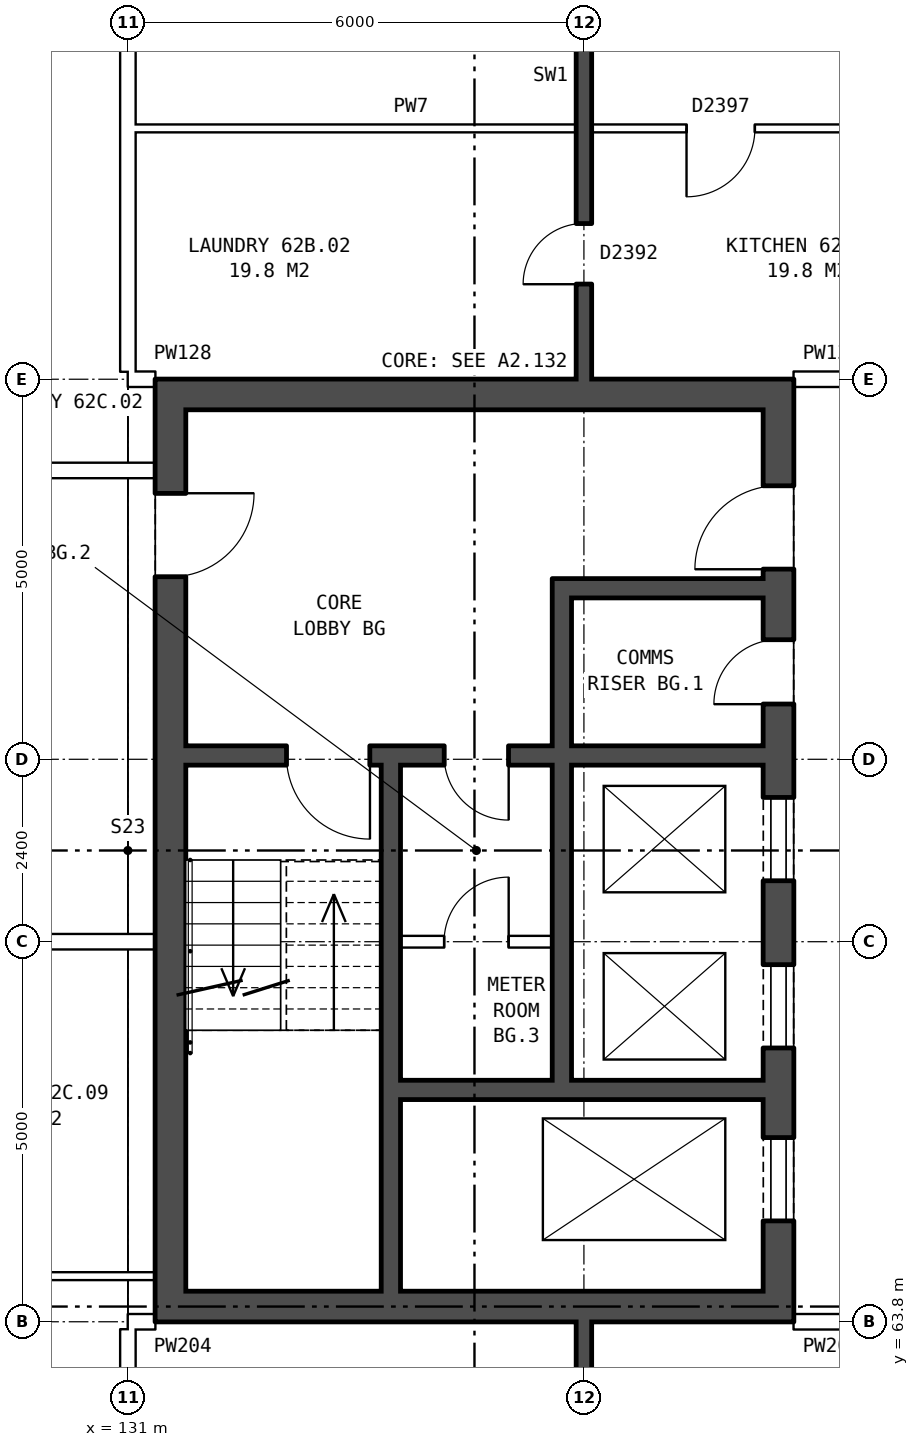
"""IFC4 building model, lengths in metres.
Left out: names, types, materials, properties, quantities, classifications, styles, units other than length and angle.
Written with IfcOpenShell. Run it as: python <this file> out.ifc"""

import sys

from ifc_helpers import new_model, si_unit, direction, frame, frame_2d, origin, place, context, subcontext, project, spatial, rectangle, extrude, element, fill, save


model = new_model("IFC4")
c1 = context("Model", 3, precision=1e-05, world=origin(), true_north=direction((0.0, 1.0)))
c2 = subcontext(c1, "Body", "Model", "MODEL_VIEW")
j1 = project(units=[si_unit("LENGTHUNIT", "METRE"), si_unit("PLANEANGLEUNIT", "RADIAN")], contexts=[c1])
p1 = place(None, origin())
s1 = spatial("IfcSite", under=j1, at=p1, CompositionType="ELEMENT")
p2 = place(p1, origin())
s2 = spatial("IfcBuilding", under=s1, at=p2, CompositionType="ELEMENT")
p3 = place(p2, frame((0.0, 0.0, 221.4)))
s3 = spatial("IfcBuildingStorey", under=s2, at=p3, CompositionType="ELEMENT", Elevation=221.4)
p4 = place(p3, frame((139.56, 63.8, 0.0), z_axis=(0.0, 0.0, 1.0), x_axis=(0.0, 1.0, 0.0)))
e1 = element("IfcWall", 1, at=p4, inside=s3, PredefinedType="SHEAR", context=c2, shape_type="SweptSolid", body=[
    extrude(rectangle(XDim=12.4, YDim=0.4, at=frame_2d((6.2, 0.0))), origin(), (0.0, 0.0, 1.0), 2.85),
])
p5 = place(p4, frame((1.325, 0.0, 0.0)))
e2 = element("IfcOpeningElement", 2, at=p5, cuts=e1, PredefinedType="OPENING", context=c2, shape_type="SweptSolid", body=[
    extrude(rectangle(XDim=1.1, YDim=2.1, at=frame_2d((0.55, 1.05))), frame((0.0, 0.21, 0.0), z_axis=(0.0, -1.0, 0.0), x_axis=(1.0, 0.0, 0.0)), (0.0, 0.0, 1.0), 0.42),
])
p6 = place(p4, frame((3.6, 0.0, 0.0)))
e3 = element("IfcOpeningElement", 3, at=p6, cuts=e1, PredefinedType="OPENING", context=c2, shape_type="SweptSolid", body=[
    extrude(rectangle(XDim=1.1, YDim=2.1, at=frame_2d((0.55, 1.05))), frame((0.0, 0.21, 0.0), z_axis=(0.0, -1.0, 0.0), x_axis=(1.0, 0.0, 0.0)), (0.0, 0.0, 1.0), 0.42),
])
p7 = place(p4, frame((5.8, 0.0, 0.0)))
e4 = element("IfcOpeningElement", 4, at=p7, cuts=e1, PredefinedType="OPENING", context=c2, shape_type="SweptSolid", body=[
    extrude(rectangle(XDim=1.1, YDim=2.1, at=frame_2d((0.55, 1.05))), frame((0.0, 0.21, 0.0), z_axis=(0.0, -1.0, 0.0), x_axis=(1.0, 0.0, 0.0)), (0.0, 0.0, 1.0), 0.42),
])
p8 = place(p4, frame((9.9, 0.0, 0.0)))
e5 = element("IfcOpeningElement", 5, at=p8, cuts=e1, PredefinedType="OPENING", context=c2, shape_type="SweptSolid", body=[
    extrude(rectangle(XDim=1.1, YDim=2.1, at=frame_2d((0.55, 1.05))), frame((0.0, 0.21, 0.0), z_axis=(0.0, -1.0, 0.0), x_axis=(1.0, 0.0, 0.0)), (0.0, 0.0, 1.0), 0.42),
])
p9 = place(p4, frame((8.125, 0.0, 0.0)))
e6 = element("IfcOpeningElement", 6, at=p9, cuts=e1, PredefinedType="OPENING", context=c2, shape_type="SweptSolid", body=[
    extrude(rectangle(XDim=0.85, YDim=2.1, at=frame_2d((0.425, 1.05))), frame((0.0, 0.21, 0.0), z_axis=(0.0, -1.0, 0.0), x_axis=(1.0, 0.0, 0.0)), (0.0, 0.0, 1.0), 0.42),
])
p10 = place(p3, frame((131.56, 63.8, 0.0), z_axis=(0.0, 0.0, 1.0), x_axis=(0.0, 1.0, 0.0)))
e7 = element("IfcWall", 7, at=p10, inside=s3, PredefinedType="SHEAR", context=c2, shape_type="SweptSolid", body=[
    extrude(rectangle(XDim=12.4, YDim=0.4, at=frame_2d((6.2, 0.0))), origin(), (0.0, 0.0, 1.0), 2.85),
])
p11 = place(p10, frame((9.8, 0.0, 0.0)))
e8 = element("IfcOpeningElement", 8, at=p11, cuts=e7, PredefinedType="OPENING", context=c2, shape_type="SweptSolid", body=[
    extrude(rectangle(XDim=1.1, YDim=2.1, at=frame_2d((0.55, 1.05))), frame((0.0, 0.21, 0.0), z_axis=(0.0, -1.0, 0.0), x_axis=(1.0, 0.0, 0.0)), (0.0, 0.0, 1.0), 0.42),
])
for number, where, z_axis, x_axis in (
    (9, (139.36, 64.0, 0.0), (0.0, 0.0, 1.0), (-1.0, 0.0, 0.0)),
    (10, (139.36, 76.0, 0.0), (0.0, 0.0, 1.0), (-1.0, 0.0, 0.0)),
):
    element("IfcWall", number, at=place(p3, frame(where, z_axis=z_axis, x_axis=x_axis)), inside=s3, PredefinedType="SHEAR", context=c2, shape_type="SweptSolid", body=[
        extrude(rectangle(XDim=7.6, YDim=0.4, at=frame_2d((3.8, 0.0))), origin(), (0.0, 0.0, 1.0), 2.85),
    ])
p12 = place(p3, frame((139.36, 66.85, 0.0), z_axis=(0.0, 0.0, 1.0), x_axis=(-1.0, 0.0, 0.0)))
e11 = element("IfcWall", 11, at=p12, inside=s3, PredefinedType="SHEAR", context=c2, shape_type="SweptSolid", body=[
    extrude(rectangle(XDim=4.775, YDim=0.25, at=frame_2d((2.388, 0.0))), origin(), (0.0, 0.0, 1.0), 2.85),
])
p13 = place(p3, frame((136.585, 68.8, 0.0), z_axis=(0.0, 0.0, 1.0), x_axis=(-1.0, 0.0, 0.0)))
e12 = element("IfcWall", 12, at=p13, inside=s3, PredefinedType="PARTITIONING", context=c2, shape_type="SweptSolid", body=[
    extrude(rectangle(XDim=2.0, YDim=0.15, at=frame_2d((1.0, 0.0))), origin(), (0.0, 0.0, 1.0), 2.85),
])
p14 = place(p13, frame((0.575, 0.0, 0.0)))
e13 = element("IfcOpeningElement", 13, at=p14, cuts=e12, PredefinedType="OPENING", context=c2, shape_type="SweptSolid", body=[
    extrude(rectangle(XDim=0.85, YDim=2.1, at=frame_2d((0.425, 1.05))), frame((0.0, 0.085, 0.0), z_axis=(0.0, -1.0, 0.0), x_axis=(1.0, 0.0, 0.0)), (0.0, 0.0, 1.0), 0.17),
])
p15 = place(p3, frame((139.36, 71.25, 0.0), z_axis=(0.0, 0.0, 1.0), x_axis=(-1.0, 0.0, 0.0)))
e14 = element("IfcWall", 14, at=p15, inside=s3, PredefinedType="SHEAR", context=c2, shape_type="SweptSolid", body=[
    extrude(rectangle(XDim=7.6, YDim=0.25, at=frame_2d((3.8, 0.0))), origin(), (0.0, 0.0, 1.0), 2.85),
])
p16 = place(p15, frame((5.175, 0.0, 0.0)))
e15 = element("IfcOpeningElement", 15, at=p16, cuts=e14, PredefinedType="OPENING", context=c2, shape_type="SweptSolid", body=[
    extrude(rectangle(XDim=1.1, YDim=2.1, at=frame_2d((0.55, 1.05))), frame((0.0, 0.135, 0.0), z_axis=(0.0, -1.0, 0.0), x_axis=(1.0, 0.0, 0.0)), (0.0, 0.0, 1.0), 0.27),
])
p17 = place(p15, frame((3.35, 0.0, 0.0)))
e16 = element("IfcOpeningElement", 16, at=p17, cuts=e14, PredefinedType="OPENING", context=c2, shape_type="SweptSolid", body=[
    extrude(rectangle(XDim=0.85, YDim=2.1, at=frame_2d((0.425, 1.05))), frame((0.0, 0.135, 0.0), z_axis=(0.0, -1.0, 0.0), x_axis=(1.0, 0.0, 0.0)), (0.0, 0.0, 1.0), 0.27),
])
p18 = place(p3, frame((139.36, 73.45, 0.0), z_axis=(0.0, 0.0, 1.0), x_axis=(-1.0, 0.0, 0.0)))
e17 = element("IfcWall", 17, at=p18, inside=s3, PredefinedType="SHEAR", context=c2, shape_type="SweptSolid", body=[
    extrude(rectangle(XDim=2.525, YDim=0.25, at=frame_2d((1.263, 0.0))), origin(), (0.0, 0.0, 1.0), 2.85),
])
p19 = place(p3, frame((136.71, 66.975, 0.0), z_axis=(0.0, 0.0, 1.0), x_axis=(0.0, 1.0, 0.0)))
e18 = element("IfcWall", 18, at=p19, inside=s3, PredefinedType="SHEAR", context=c2, shape_type="SweptSolid", body=[
    extrude(rectangle(XDim=4.15, YDim=0.25, at=frame_2d((2.075, 0.0))), origin(), (0.0, 0.0, 1.0), 2.85),
])
p20 = place(p3, frame((136.71, 71.375, 0.0), z_axis=(0.0, 0.0, 1.0), x_axis=(0.0, 1.0, 0.0)))
e19 = element("IfcWall", 19, at=p20, inside=s3, PredefinedType="SHEAR", context=c2, shape_type="SweptSolid", body=[
    extrude(rectangle(XDim=2.2, YDim=0.25, at=frame_2d((1.1, 0.0))), origin(), (0.0, 0.0, 1.0), 2.85),
])
p21 = place(p3, frame((134.46, 64.2, 0.0), z_axis=(0.0, 0.0, 1.0), x_axis=(0.0, 1.0, 0.0)))
e20 = element("IfcWall", 20, at=p21, inside=s3, PredefinedType="SHEAR", context=c2, shape_type="SweptSolid", body=[
    extrude(rectangle(XDim=6.925, YDim=0.25, at=frame_2d((3.462, 0.0))), origin(), (0.0, 0.0, 1.0), 2.85),
])
p22 = place(p3, frame((131.0, 63.8, 0.0), z_axis=(0.0, 0.0, 1.0), x_axis=(1.0, 0.0, 0.0)))
e21 = element("IfcWall", 21, at=p22, inside=s3, PredefinedType="PARTITIONING", context=c2, shape_type="SweptSolid", body=[
    extrude(rectangle(XDim=0.36, YDim=0.2, at=frame_2d((0.18, 0.0))), origin(), (0.0, 0.0, 1.0), 2.85),
])
p23 = place(p3, frame((139.76, 63.8, 0.0), z_axis=(0.0, 0.0, 1.0), x_axis=(1.0, 0.0, 0.0)))
e22 = element("IfcWall", 22, at=p23, inside=s3, PredefinedType="PARTITIONING", context=c2, shape_type="SweptSolid", body=[
    extrude(rectangle(XDim=3.0, YDim=0.2, at=frame_2d((1.5, 0.0))), origin(), (0.0, 0.0, 1.0), 2.85),
])
p24 = place(p23, frame((1.0, 0.0, 0.0)))
e23 = element("IfcOpeningElement", 23, at=p24, cuts=e22, PredefinedType="OPENING", context=c2, shape_type="SweptSolid", body=[
    extrude(rectangle(XDim=1.0, YDim=2.1, at=frame_2d((0.5, 1.05))), frame((0.0, 0.11, 0.0), z_axis=(0.0, -1.0, 0.0), x_axis=(1.0, 0.0, 0.0)), (0.0, 0.0, 1.0), 0.22),
])
p25 = place(p3, frame((127.912, 64.4, 0.0), z_axis=(0.0, 0.0, 1.0), x_axis=(1.0, 0.0, 0.0)))
e24 = element("IfcWall", 24, at=p25, inside=s3, PredefinedType="PARTITIONING", context=c2, shape_type="SweptSolid", body=[
    extrude(rectangle(XDim=3.448, YDim=0.1, at=frame_2d((1.724, 0.0))), origin(), (0.0, 0.0, 1.0), 2.85),
])
p26 = place(p3, frame((75.64, 68.8, 0.0), z_axis=(0.0, 0.0, 1.0), x_axis=(1.0, 0.0, 0.0)))
e25 = element("IfcWall", 25, at=p26, inside=s3, PredefinedType="PARTITIONING", context=c2, shape_type="SweptSolid", body=[
    extrude(rectangle(XDim=55.72, YDim=0.2, at=frame_2d((27.86, 0.0))), origin(), (0.0, 0.0, 1.0), 2.85),
])
p27 = place(p26, frame((1.399, 0.0, 0.0)))
e26 = element("IfcOpeningElement", 26, at=p27, cuts=e25, PredefinedType="OPENING", context=c2, shape_type="SweptSolid", body=[
    extrude(rectangle(XDim=1.0, YDim=2.1, at=frame_2d((0.5, 1.05))), frame((0.0, 0.11, 0.0), z_axis=(0.0, -1.0, 0.0), x_axis=(1.0, 0.0, 0.0)), (0.0, 0.0, 1.0), 0.22),
])
p28 = place(p26, frame((12.241, 0.0, 0.0)))
e27 = element("IfcOpeningElement", 27, at=p28, cuts=e25, PredefinedType="OPENING", context=c2, shape_type="SweptSolid", body=[
    extrude(rectangle(XDim=1.0, YDim=2.1, at=frame_2d((0.5, 1.05))), frame((0.0, 0.11, 0.0), z_axis=(0.0, -1.0, 0.0), x_axis=(1.0, 0.0, 0.0)), (0.0, 0.0, 1.0), 0.22),
])
p29 = place(p26, frame((22.553, 0.0, 0.0)))
e28 = element("IfcOpeningElement", 28, at=p29, cuts=e25, PredefinedType="OPENING", context=c2, shape_type="SweptSolid", body=[
    extrude(rectangle(XDim=1.0, YDim=2.1, at=frame_2d((0.5, 1.05))), frame((0.0, 0.11, 0.0), z_axis=(0.0, -1.0, 0.0), x_axis=(1.0, 0.0, 0.0)), (0.0, 0.0, 1.0), 0.22),
])
p30 = place(p26, frame((32.866, 0.0, 0.0)))
e29 = element("IfcOpeningElement", 29, at=p30, cuts=e25, PredefinedType="OPENING", context=c2, shape_type="SweptSolid", body=[
    extrude(rectangle(XDim=1.0, YDim=2.1, at=frame_2d((0.5, 1.05))), frame((0.0, 0.11, 0.0), z_axis=(0.0, -1.0, 0.0), x_axis=(1.0, 0.0, 0.0)), (0.0, 0.0, 1.0), 0.22),
])
p31 = place(p26, frame((36.303, 0.0, 0.0)))
e30 = element("IfcOpeningElement", 30, at=p31, cuts=e25, PredefinedType="OPENING", context=c2, shape_type="SweptSolid", body=[
    extrude(rectangle(XDim=1.0, YDim=2.1, at=frame_2d((0.5, 1.05))), frame((0.0, 0.11, 0.0), z_axis=(0.0, -1.0, 0.0), x_axis=(1.0, 0.0, 0.0)), (0.0, 0.0, 1.0), 0.22),
])
p32 = place(p26, frame((46.616, 0.0, 0.0)))
e31 = element("IfcOpeningElement", 31, at=p32, cuts=e25, PredefinedType="OPENING", context=c2, shape_type="SweptSolid", body=[
    extrude(rectangle(XDim=1.0, YDim=2.1, at=frame_2d((0.5, 1.05))), frame((0.0, 0.11, 0.0), z_axis=(0.0, -1.0, 0.0), x_axis=(1.0, 0.0, 0.0)), (0.0, 0.0, 1.0), 0.22),
])
p33 = place(p26, frame((50.053, 0.0, 0.0)))
e32 = element("IfcOpeningElement", 32, at=p33, cuts=e25, PredefinedType="OPENING", context=c2, shape_type="SweptSolid", body=[
    extrude(rectangle(XDim=1.0, YDim=2.1, at=frame_2d((0.5, 1.05))), frame((0.0, 0.11, 0.0), z_axis=(0.0, -1.0, 0.0), x_axis=(1.0, 0.0, 0.0)), (0.0, 0.0, 1.0), 0.22),
])
p34 = place(p3, frame((124.475, 75.0, 0.0), z_axis=(0.0, 0.0, 1.0), x_axis=(1.0, 0.0, 0.0)))
e33 = element("IfcWall", 33, at=p34, inside=s3, PredefinedType="PARTITIONING", context=c2, shape_type="SweptSolid", body=[
    extrude(rectangle(XDim=6.885, YDim=0.2, at=frame_2d((3.442, 0.0))), origin(), (0.0, 0.0, 1.0), 2.85),
])
p35 = place(p34, frame((2.992, 0.0, 0.0)))
e34 = element("IfcOpeningElement", 34, at=p35, cuts=e33, PredefinedType="OPENING", context=c2, shape_type="SweptSolid", body=[
    extrude(rectangle(XDim=0.9, YDim=2.1, at=frame_2d((0.45, 1.05))), frame((0.0, 0.11, 0.0), z_axis=(0.0, -1.0, 0.0), x_axis=(1.0, 0.0, 0.0)), (0.0, 0.0, 1.0), 0.22),
])
p36 = place(p3, frame((131.0, 76.2, 0.0), z_axis=(0.0, 0.0, 1.0), x_axis=(1.0, 0.0, 0.0)))
e35 = element("IfcWall", 35, at=p36, inside=s3, PredefinedType="PARTITIONING", context=c2, shape_type="SweptSolid", body=[
    extrude(rectangle(XDim=0.36, YDim=0.2, at=frame_2d((0.18, 0.0))), origin(), (0.0, 0.0, 1.0), 2.85),
])
p37 = place(p3, frame((139.76, 76.2, 0.0), z_axis=(0.0, 0.0, 1.0), x_axis=(1.0, 0.0, 0.0)))
e36 = element("IfcWall", 36, at=p37, inside=s3, PredefinedType="PARTITIONING", context=c2, shape_type="SweptSolid", body=[
    extrude(rectangle(XDim=3.0, YDim=0.2, at=frame_2d((1.5, 0.0))), origin(), (0.0, 0.0, 1.0), 2.85),
])
p38 = place(p37, frame((1.0, 0.0, 0.0)))
e37 = element("IfcOpeningElement", 37, at=p38, cuts=e36, PredefinedType="OPENING", context=c2, shape_type="SweptSolid", body=[
    extrude(rectangle(XDim=1.0, YDim=2.1, at=frame_2d((0.5, 1.05))), frame((0.0, 0.11, 0.0), z_axis=(0.0, -1.0, 0.0), x_axis=(1.0, 0.0, 0.0)), (0.0, 0.0, 1.0), 0.22),
])
p39 = place(p3, frame((131.1, 79.5, 0.0), z_axis=(0.0, 0.0, 1.0), x_axis=(1.0, 0.0, 0.0)))
e38 = element("IfcWall", 38, at=p39, inside=s3, PredefinedType="PARTITIONING", context=c2, shape_type="SweptSolid", body=[
    extrude(rectangle(XDim=11.8, YDim=0.1, at=frame_2d((5.9, 0.0))), origin(), (0.0, 0.0, 1.0), 2.85),
])
p40 = place(p39, frame((7.25, 0.0, 0.0)))
e39 = element("IfcOpeningElement", 39, at=p40, cuts=e38, PredefinedType="OPENING", context=c2, shape_type="SweptSolid", body=[
    extrude(rectangle(XDim=0.9, YDim=2.1, at=frame_2d((0.45, 1.05))), frame((0.0, 0.06, 0.0), z_axis=(0.0, -1.0, 0.0), x_axis=(1.0, 0.0, 0.0)), (0.0, 0.0, 1.0), 0.12),
])
p41 = place(p39, frame((10.2, 0.0, 0.0)))
e40 = element("IfcOpeningElement", 40, at=p41, cuts=e38, PredefinedType="OPENING", context=c2, shape_type="SweptSolid", body=[
    extrude(rectangle(XDim=0.9, YDim=2.1, at=frame_2d((0.45, 1.05))), frame((0.0, 0.06, 0.0), z_axis=(0.0, -1.0, 0.0), x_axis=(1.0, 0.0, 0.0)), (0.0, 0.0, 1.0), 0.12),
])
for number, where, z_axis, x_axis in (
    (41, (131.0, 54.36, 0.0), (0.0, 0.0, 1.0), (0.0, 1.0, 0.0)),
    (42, (131.0, 76.3, 0.0), (0.0, 0.0, 1.0), (0.0, 1.0, 0.0)),
):
    element("IfcWall", number, at=place(p3, frame(where, z_axis=z_axis, x_axis=x_axis)), inside=s3, PredefinedType="PARTITIONING", context=c2, shape_type="SweptSolid", body=[
        extrude(rectangle(XDim=9.34, YDim=0.2, at=frame_2d((4.67, 0.0))), origin(), (0.0, 0.0, 1.0), 2.85),
    ])
p42 = place(p3, frame((137.0, 54.36, 0.0), z_axis=(0.0, 0.0, 1.0), x_axis=(0.0, 1.0, 0.0)))
e43 = element("IfcWall", 43, at=p42, inside=s3, PredefinedType="SOLIDWALL", context=c2, shape_type="SweptSolid", body=[
    extrude(rectangle(XDim=9.44, YDim=0.2, at=frame_2d((4.72, 0.0))), origin(), (0.0, 0.0, 1.0), 2.85),
])
p43 = place(p42, frame((2.47, 0.0, 0.0)))
e44 = element("IfcOpeningElement", 44, at=p43, cuts=e43, PredefinedType="OPENING", context=c2, shape_type="SweptSolid", body=[
    extrude(rectangle(XDim=0.9, YDim=2.1, at=frame_2d((0.45, 1.05))), frame((0.0, 0.11, 0.0), z_axis=(0.0, -1.0, 0.0), x_axis=(1.0, 0.0, 0.0)), (0.0, 0.0, 1.0), 0.22),
])
p44 = place(p42, frame((7.39, 0.0, 0.0)))
e45 = element("IfcOpeningElement", 45, at=p44, cuts=e43, PredefinedType="OPENING", context=c2, shape_type="SweptSolid", body=[
    extrude(rectangle(XDim=0.8, YDim=2.1, at=frame_2d((0.4, 1.05))), frame((0.0, 0.11, 0.0), z_axis=(0.0, -1.0, 0.0), x_axis=(1.0, 0.0, 0.0)), (0.0, 0.0, 1.0), 0.22),
])
p45 = place(p3, frame((137.0, 76.2, 0.0), z_axis=(0.0, 0.0, 1.0), x_axis=(0.0, 1.0, 0.0)))
e46 = element("IfcWall", 46, at=p45, inside=s3, PredefinedType="SOLIDWALL", context=c2, shape_type="SweptSolid", body=[
    extrude(rectangle(XDim=9.44, YDim=0.2, at=frame_2d((4.72, 0.0))), origin(), (0.0, 0.0, 1.0), 2.85),
])
p46 = place(p45, frame((5.92, 0.0, 0.0)))
e47 = element("IfcOpeningElement", 47, at=p46, cuts=e46, PredefinedType="OPENING", context=c2, shape_type="SweptSolid", body=[
    extrude(rectangle(XDim=0.9, YDim=2.1, at=frame_2d((0.45, 1.05))), frame((0.0, 0.11, 0.0), z_axis=(0.0, -1.0, 0.0), x_axis=(1.0, 0.0, 0.0)), (0.0, 0.0, 1.0), 0.22),
])
p47 = place(p45, frame((1.25, 0.0, 0.0)))
e48 = element("IfcOpeningElement", 48, at=p47, cuts=e46, PredefinedType="OPENING", context=c2, shape_type="SweptSolid", body=[
    extrude(rectangle(XDim=0.8, YDim=2.1, at=frame_2d((0.4, 1.05))), frame((0.0, 0.11, 0.0), z_axis=(0.0, -1.0, 0.0), x_axis=(1.0, 0.0, 0.0)), (0.0, 0.0, 1.0), 0.22),
])
p48 = place(p5, origin())
e49 = element("IfcDoor", 49, at=p48, inside=s3, OperationType="DOUBLE_DOOR_SLIDING", PredefinedType="DOOR", context=c2, shape_type="SweptSolid", body=[
    extrude(rectangle(XDim=1.1, YDim=2.1, at=frame_2d((0.55, 1.05))), frame((0.0, 0.185, 0.0), z_axis=(0.0, -1.0, 0.0), x_axis=(1.0, 0.0, 0.0)), (0.0, 0.0, 1.0), 0.05),
])
fill(e2, e49)
p49 = place(p6, origin())
e50 = element("IfcDoor", 50, at=p49, inside=s3, OperationType="DOUBLE_DOOR_SLIDING", PredefinedType="DOOR", context=c2, shape_type="SweptSolid", body=[
    extrude(rectangle(XDim=1.1, YDim=2.1, at=frame_2d((0.55, 1.05))), frame((0.0, 0.185, 0.0), z_axis=(0.0, -1.0, 0.0), x_axis=(1.0, 0.0, 0.0)), (0.0, 0.0, 1.0), 0.05),
])
fill(e3, e50)
p50 = place(p7, origin())
e51 = element("IfcDoor", 51, at=p50, inside=s3, OperationType="DOUBLE_DOOR_SLIDING", PredefinedType="DOOR", context=c2, shape_type="SweptSolid", body=[
    extrude(rectangle(XDim=1.1, YDim=2.1, at=frame_2d((0.55, 1.05))), frame((0.0, 0.185, 0.0), z_axis=(0.0, -1.0, 0.0), x_axis=(1.0, 0.0, 0.0)), (0.0, 0.0, 1.0), 0.05),
])
fill(e4, e51)
p51 = place(p8, origin())
e52 = element("IfcDoor", 52, at=p51, inside=s3, OperationType="SINGLE_SWING_LEFT", PredefinedType="DOOR", context=c2, shape_type="SweptSolid", body=[
    extrude(rectangle(XDim=1.1, YDim=2.1, at=frame_2d((0.55, 1.05))), frame((0.0, 0.185, 0.0), z_axis=(0.0, -1.0, 0.0), x_axis=(1.0, 0.0, 0.0)), (0.0, 0.0, 1.0), 0.05),
])
fill(e5, e52)
p52 = place(p16, origin())
e53 = element("IfcDoor", 53, at=p52, inside=s3, OperationType="SINGLE_SWING_LEFT", PredefinedType="DOOR", context=c2, shape_type="SweptSolid", body=[
    extrude(rectangle(XDim=1.1, YDim=2.1, at=frame_2d((0.55, 1.05))), frame((0.0, 0.025, 0.0), z_axis=(0.0, -1.0, 0.0), x_axis=(1.0, 0.0, 0.0)), (0.0, 0.0, 1.0), 0.05),
])
fill(e15, e53)
p53 = place(p9, origin())
e54 = element("IfcDoor", 54, at=p53, inside=s3, OperationType="SINGLE_SWING_LEFT", PredefinedType="DOOR", context=c2, shape_type="SweptSolid", body=[
    extrude(rectangle(XDim=0.85, YDim=2.1, at=frame_2d((0.425, 1.05))), frame((0.0, 0.185, 0.0), z_axis=(0.0, -1.0, 0.0), x_axis=(1.0, 0.0, 0.0)), (0.0, 0.0, 1.0), 0.05),
])
fill(e6, e54)
p54 = place(p17, origin())
e55 = element("IfcDoor", 55, at=p54, inside=s3, OperationType="SINGLE_SWING_LEFT", PredefinedType="DOOR", context=c2, shape_type="SweptSolid", body=[
    extrude(rectangle(XDim=0.85, YDim=2.1, at=frame_2d((0.425, 1.05))), frame((0.0, 0.025, 0.0), z_axis=(0.0, -1.0, 0.0), x_axis=(1.0, 0.0, 0.0)), (0.0, 0.0, 1.0), 0.05),
])
fill(e16, e55)
p55 = place(p14, frame((0.85, 0.0, 0.0), z_axis=(0.0, 0.0, 1.0), x_axis=(-1.0, 0.0, 0.0)))
e56 = element("IfcDoor", 56, at=p55, inside=s3, OperationType="SINGLE_SWING_RIGHT", PredefinedType="DOOR", context=c2, shape_type="SweptSolid", body=[
    extrude(rectangle(XDim=0.85, YDim=2.1, at=frame_2d((0.425, 1.05))), frame((0.0, 0.025, 0.0), z_axis=(0.0, -1.0, 0.0), x_axis=(1.0, 0.0, 0.0)), (0.0, 0.0, 1.0), 0.05),
])
fill(e13, e56)
p56 = place(p11, frame((1.1, 0.0, 0.0), z_axis=(0.0, 0.0, 1.0), x_axis=(-1.0, 0.0, 0.0)))
e57 = element("IfcDoor", 57, at=p56, inside=s3, OperationType="SINGLE_SWING_LEFT", PredefinedType="DOOR", context=c2, shape_type="SweptSolid", body=[
    extrude(rectangle(XDim=1.1, YDim=2.1, at=frame_2d((0.55, 1.05))), frame((0.0, 0.185, 0.0), z_axis=(0.0, -1.0, 0.0), x_axis=(1.0, 0.0, 0.0)), (0.0, 0.0, 1.0), 0.05),
])
fill(e8, e57)
p57 = place(p40, frame((0.9, 0.0, 0.0), z_axis=(0.0, 0.0, 1.0), x_axis=(-1.0, 0.0, 0.0)))
e58 = element("IfcDoor", 58, at=p57, inside=s3, OperationType="SINGLE_SWING_RIGHT", PredefinedType="DOOR", context=c2, shape_type="SweptSolid", body=[
    extrude(rectangle(XDim=0.9, YDim=2.1, at=frame_2d((0.45, 1.05))), frame((0.0, 0.025, 0.0), z_axis=(0.0, -1.0, 0.0), x_axis=(1.0, 0.0, 0.0)), (0.0, 0.0, 1.0), 0.05),
])
fill(e39, e58)
p58 = place(p47, origin())
e59 = element("IfcDoor", 59, at=p58, inside=s3, OperationType="SINGLE_SWING_LEFT", PredefinedType="DOOR", context=c2, shape_type="SweptSolid", body=[
    extrude(rectangle(XDim=0.8, YDim=2.1, at=frame_2d((0.4, 1.05))), frame((0.0, 0.025, 0.0), z_axis=(0.0, -1.0, 0.0), x_axis=(1.0, 0.0, 0.0)), (0.0, 0.0, 1.0), 0.05),
])
fill(e48, e59)
save(model, sys.argv[1])
